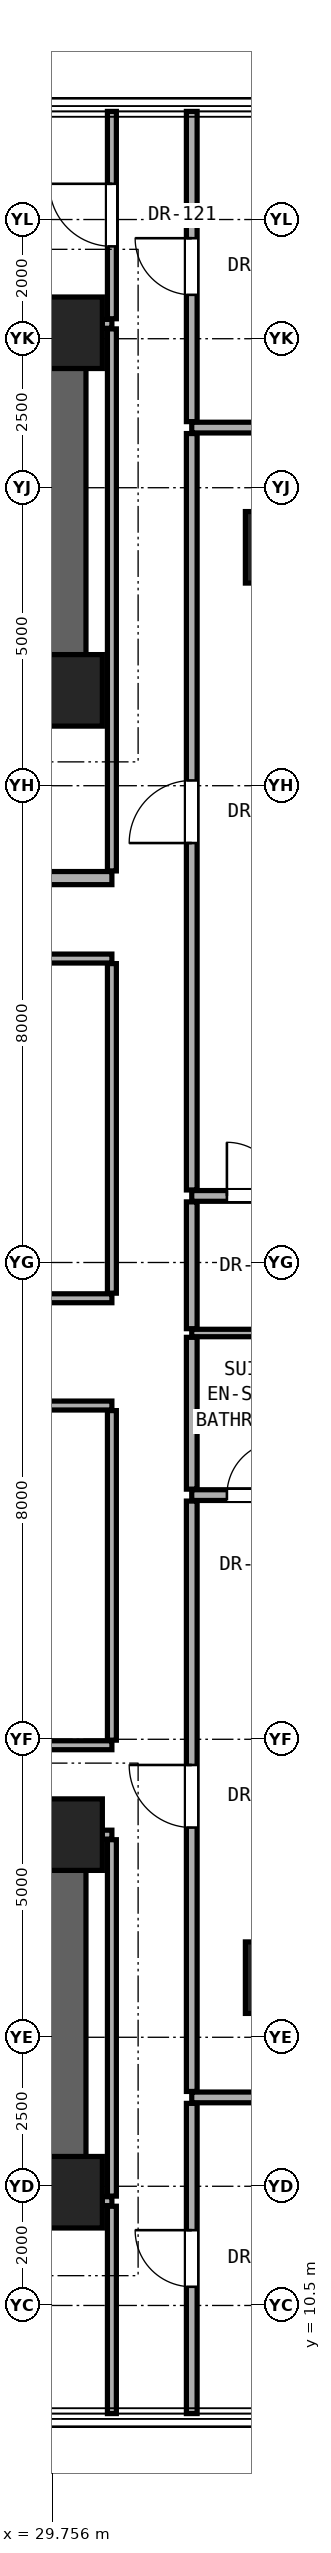
"""IFC4 building model, lengths in metres.
Left out: names, types, materials, properties, quantities, classifications, styles, units other than length and angle.
Written with IfcOpenShell. Run it as: python <this file> out.ifc"""

import sys

from ifc_helpers import new_model, si_unit, direction, frame, frame_2d, origin, origin_2d, place, context, subcontext, project, spatial, rectangle, extrude, element, fill, save


model = new_model("IFC4")
c1 = context("Model", 3, precision=1e-05, world=origin(), true_north=direction((0.0, 1.0)))
c2 = subcontext(c1, "Body", "Model", "MODEL_VIEW")
j1 = project(units=[si_unit("LENGTHUNIT", "METRE"), si_unit("PLANEANGLEUNIT", "RADIAN")], contexts=[c1])
p1 = place(None, origin())
s1 = spatial("IfcSite", under=j1, at=p1, CompositionType="ELEMENT")
p2 = place(p1, origin())
s2 = spatial("IfcBuilding", under=s1, at=p2, CompositionType="ELEMENT")
p3 = place(p2, frame((0.0, 0.0, 114.8)))
s3 = spatial("IfcBuildingStorey", under=s2, at=p3, CompositionType="ELEMENT", Elevation=114.8)
for number, where, z_axis, x_axis in (
    (1, (30.0, 12.4, 0.0), (0.0, 0.0, 1.0), (1.0, 0.0, 0.0)),
    (2, (30.0, 18.4, 0.0), (0.0, 0.0, 1.0), (1.0, 0.0, 0.0)),
    (3, (30.0, 37.6, 0.0), (0.0, 0.0, 1.0), (1.0, 0.0, 0.0)),
    (4, (30.0, 43.6, 0.0), (0.0, 0.0, 1.0), (1.0, 0.0, 0.0)),
):
    element("IfcColumn", number, at=place(p3, frame(where, z_axis=z_axis, x_axis=x_axis)), inside=s3, PredefinedType="COLUMN", context=c2, shape_type="SweptSolid", body=[
        extrude(rectangle(XDim=1.2, YDim=1.2, at=origin_2d()), origin(), (0.0, 0.0, 1.0), 3.3),
    ])
for number, where, z_axis, x_axis in (
    (5, (33.4, 16.0, 0.0), (0.0, 0.0, 1.0), (1.0, 0.0, 0.0)),
    (6, (33.4, 40.0, 0.0), (0.0, 0.0, 1.0), (1.0, 0.0, 0.0)),
):
    element("IfcColumn", number, at=place(p3, frame(where, z_axis=z_axis, x_axis=x_axis)), inside=s3, PredefinedType="PILASTER", context=c2, shape_type="SweptSolid", body=[
        extrude(rectangle(XDim=0.8, YDim=1.2, at=origin_2d()), origin(), (0.0, 0.0, 1.0), 3.3),
    ])
p4 = place(p3, frame((11.0, 43.6, 0.0), z_axis=(0.0, 0.0, 1.0), x_axis=(1.0, 0.0, 0.0)))
e7 = element("IfcWall", 7, at=p4, inside=s3, PredefinedType="SHEAR", context=c2, shape_type="SweptSolid", body=[
    extrude(rectangle(XDim=19.0, YDim=0.65, at=frame_2d((9.5, 0.0))), origin(), (0.0, 0.0, 1.0), 3.08),
])
p5 = place(p3, frame((30.0, 37.6, 0.0), z_axis=(0.0, 0.0, 1.0), x_axis=(0.0, 1.0, 0.0)))
e8 = element("IfcWall", 8, at=p5, inside=s3, PredefinedType="SHEAR", context=c2, shape_type="SweptSolid", body=[
    extrude(rectangle(XDim=6.0, YDim=0.65, at=frame_2d((3.0, 0.0))), origin(), (0.0, 0.0, 1.0), 3.08),
])
p6 = place(p3, frame((11.0, 37.6, 0.0), z_axis=(0.0, 0.0, 1.0), x_axis=(1.0, 0.0, 0.0)))
e9 = element("IfcWall", 9, at=p6, inside=s3, PredefinedType="SHEAR", context=c2, shape_type="SweptSolid", body=[
    extrude(rectangle(XDim=19.0, YDim=0.65, at=frame_2d((9.5, 0.0))), origin(), (0.0, 0.0, 1.0), 3.08),
])
p7 = place(p6, frame((1.06, 0.0, 0.0)))
e10 = element("IfcOpeningElement", 10, at=p7, cuts=e9, PredefinedType="OPENING", context=c2, shape_type="SweptSolid", body=[
    extrude(rectangle(XDim=1.15, YDim=2.2, at=frame_2d((0.575, 1.1))), frame((0.0, 0.335, 0.0), z_axis=(0.0, -1.0, 0.0), x_axis=(1.0, 0.0, 0.0)), (0.0, 0.0, 1.0), 0.67),
])
p8 = place(p6, frame((9.55, 0.0, 0.0)))
e11 = element("IfcOpeningElement", 11, at=p8, cuts=e9, PredefinedType="OPENING", context=c2, shape_type="SweptSolid", body=[
    extrude(rectangle(XDim=1.4, YDim=2.35, at=frame_2d((0.7, 1.175))), frame((0.0, 0.335, 0.0), z_axis=(0.0, -1.0, 0.0), x_axis=(1.0, 0.0, 0.0)), (0.0, 0.0, 1.0), 0.67),
])
p9 = place(p6, frame((11.95, 0.0, 0.0)))
e12 = element("IfcOpeningElement", 12, at=p9, cuts=e9, PredefinedType="OPENING", context=c2, shape_type="SweptSolid", body=[
    extrude(rectangle(XDim=1.4, YDim=2.35, at=frame_2d((0.7, 1.175))), frame((0.0, 0.335, 0.0), z_axis=(0.0, -1.0, 0.0), x_axis=(1.0, 0.0, 0.0)), (0.0, 0.0, 1.0), 0.67),
])
p10 = place(p3, frame((11.0, 12.4, 0.0), z_axis=(0.0, 0.0, 1.0), x_axis=(1.0, 0.0, 0.0)))
e13 = element("IfcWall", 13, at=p10, inside=s3, PredefinedType="SHEAR", context=c2, shape_type="SweptSolid", body=[
    extrude(rectangle(XDim=19.0, YDim=0.65, at=frame_2d((9.5, 0.0))), origin(), (0.0, 0.0, 1.0), 3.08),
])
p11 = place(p3, frame((30.0, 12.4, 0.0), z_axis=(0.0, 0.0, 1.0), x_axis=(0.0, 1.0, 0.0)))
e14 = element("IfcWall", 14, at=p11, inside=s3, PredefinedType="SHEAR", context=c2, shape_type="SweptSolid", body=[
    extrude(rectangle(XDim=6.0, YDim=0.65, at=frame_2d((3.0, 0.0))), origin(), (0.0, 0.0, 1.0), 3.08),
])
p12 = place(p3, frame((11.0, 18.4, 0.0), z_axis=(0.0, 0.0, 1.0), x_axis=(1.0, 0.0, 0.0)))
e15 = element("IfcWall", 15, at=p12, inside=s3, PredefinedType="SHEAR", context=c2, shape_type="SweptSolid", body=[
    extrude(rectangle(XDim=19.0, YDim=0.65, at=frame_2d((9.5, 0.0))), origin(), (0.0, 0.0, 1.0), 3.08),
])
p13 = place(p12, frame((4.175, 0.0, 0.0)))
e16 = element("IfcOpeningElement", 16, at=p13, cuts=e15, PredefinedType="OPENING", context=c2, shape_type="SweptSolid", body=[
    extrude(rectangle(XDim=1.2, YDim=2.25, at=frame_2d((0.6, 1.125))), frame((0.0, 0.335, 0.0), z_axis=(0.0, -1.0, 0.0), x_axis=(1.0, 0.0, 0.0)), (0.0, 0.0, 1.0), 0.67),
])
p14 = place(p12, frame((9.6, 0.0, 0.0)))
e17 = element("IfcOpeningElement", 17, at=p14, cuts=e15, PredefinedType="OPENING", context=c2, shape_type="SweptSolid", body=[
    extrude(rectangle(XDim=1.3, YDim=2.3, at=frame_2d((0.65, 1.15))), frame((0.0, 0.335, 0.0), z_axis=(0.0, -1.0, 0.0), x_axis=(1.0, 0.0, 0.0)), (0.0, 0.0, 1.0), 0.67),
])
p15 = place(p12, frame((11.9, 0.0, 0.0)))
e18 = element("IfcOpeningElement", 18, at=p15, cuts=e15, PredefinedType="OPENING", context=c2, shape_type="SweptSolid", body=[
    extrude(rectangle(XDim=1.3, YDim=2.3, at=frame_2d((0.65, 1.15))), frame((0.0, 0.335, 0.0), z_axis=(0.0, -1.0, 0.0), x_axis=(1.0, 0.0, 0.0)), (0.0, 0.0, 1.0), 0.67),
])
p16 = place(p12, frame((14.3, 0.0, 0.0)))
e19 = element("IfcOpeningElement", 19, at=p16, cuts=e15, PredefinedType="OPENING", context=c2, shape_type="SweptSolid", body=[
    extrude(rectangle(XDim=1.3, YDim=2.3, at=frame_2d((0.65, 1.15))), frame((0.0, 0.335, 0.0), z_axis=(0.0, -1.0, 0.0), x_axis=(1.0, 0.0, 0.0)), (0.0, 0.0, 1.0), 0.67),
])
p17 = place(p12, frame((16.6, 0.0, 0.0)))
e20 = element("IfcOpeningElement", 20, at=p17, cuts=e15, PredefinedType="OPENING", context=c2, shape_type="SweptSolid", body=[
    extrude(rectangle(XDim=1.3, YDim=2.3, at=frame_2d((0.65, 1.15))), frame((0.0, 0.335, 0.0), z_axis=(0.0, -1.0, 0.0), x_axis=(1.0, 0.0, 0.0)), (0.0, 0.0, 1.0), 0.67),
])
p18 = place(p3, frame((30.32, 12.25, 0.0), z_axis=(0.0, 0.0, 1.0), x_axis=(1.0, 0.0, 0.0)))
e21 = element("IfcWall", 21, at=p18, inside=s3, PredefinedType="PARTITIONING", context=c2, shape_type="SweptSolid", body=[
    extrude(rectangle(XDim=0.44, YDim=0.15, at=frame_2d((0.22, 0.0))), origin(), (0.0, 0.0, 1.0), 3.08),
])
p19 = place(p3, frame((32.1, 13.991, 0.0), z_axis=(0.0, 0.0, 1.0), x_axis=(1.0, 0.0, 0.0)))
e22 = element("IfcWall", 22, at=p19, inside=s3, PredefinedType="PARTITIONING", context=c2, shape_type="SweptSolid", body=[
    extrude(rectangle(XDim=5.545, YDim=0.18, at=frame_2d((2.772, 0.0))), origin(), (0.0, 0.0, 1.0), 3.08),
])
p20 = place(p3, frame((30.32, 18.4, 0.0), z_axis=(0.0, 0.0, 1.0), x_axis=(1.0, 0.0, 0.0)))
e23 = element("IfcWall", 23, at=p20, inside=s3, PredefinedType="PARTITIONING", context=c2, shape_type="SweptSolid", body=[
    extrude(rectangle(XDim=0.44, YDim=0.15, at=frame_2d((0.22, 0.0))), origin(), (0.0, 0.0, 1.0), 2.456),
])
p21 = place(p3, frame((21.44, 19.9, 0.0), z_axis=(0.0, 0.0, 1.0), x_axis=(1.0, 0.0, 0.0)))
e24 = element("IfcWall", 24, at=p21, inside=s3, PredefinedType="PARTITIONING", context=c2, shape_type="SweptSolid", body=[
    extrude(rectangle(XDim=9.32, YDim=0.15, at=frame_2d((4.66, 0.0))), origin(), (0.0, 0.0, 1.0), 2.124),
])
p22 = place(p21, frame((4.235, 0.0, 0.0)))
e25 = element("IfcOpeningElement", 25, at=p22, cuts=e24, PredefinedType="OPENING", context=c2, shape_type="SweptSolid", body=[
    extrude(rectangle(XDim=0.85, YDim=2.01, at=frame_2d((0.425, 1.005))), frame((0.0, 0.085, 0.0), z_axis=(0.0, -1.0, 0.0), x_axis=(1.0, 0.0, 0.0)), (0.0, 0.0, 1.0), 0.17),
])
p23 = place(p3, frame((32.1, 24.097, 0.0), z_axis=(0.0, 0.0, 1.0), x_axis=(1.0, 0.0, 0.0)))
e26 = element("IfcWall", 26, at=p23, inside=s3, PredefinedType="PARTITIONING", context=c2, shape_type="SweptSolid", body=[
    extrude(rectangle(XDim=10.87, YDim=0.18, at=frame_2d((5.435, 0.0))), origin(), (0.0, 0.0, 1.0), 2.145),
])
p24 = place(p23, frame((5.06, 0.0, 0.0)))
e27 = element("IfcOpeningElement", 27, at=p24, cuts=e26, PredefinedType="OPENING", context=c2, shape_type="SweptSolid", body=[
    extrude(rectangle(XDim=0.85, YDim=2.01, at=frame_2d((0.425, 1.005))), frame((0.0, 0.1, 0.0), z_axis=(0.0, -1.0, 0.0), x_axis=(1.0, 0.0, 0.0)), (0.0, 0.0, 1.0), 0.2),
])
p25 = place(p23, frame((0.59, 0.0, 0.0)))
e28 = element("IfcOpeningElement", 28, at=p25, cuts=e26, PredefinedType="OPENING", context=c2, shape_type="SweptSolid", body=[
    extrude(rectangle(XDim=0.9, YDim=2.1, at=frame_2d((0.45, 1.05))), frame((0.0, 0.1, 0.0), z_axis=(0.0, -1.0, 0.0), x_axis=(1.0, 0.0, 0.0)), (0.0, 0.0, 1.0), 0.2),
])
p26 = place(p3, frame((21.4, 25.6, 0.0), z_axis=(0.0, 0.0, 1.0), x_axis=(1.0, 0.0, 0.0)))
e29 = element("IfcWall", 29, at=p26, inside=s3, PredefinedType="PARTITIONING", context=c2, shape_type="SweptSolid", body=[
    extrude(rectangle(XDim=9.36, YDim=0.15, at=frame_2d((4.68, 0.0))), origin(), (0.0, 0.0, 1.0), 2.124),
])
p27 = place(p3, frame((32.1, 26.817, 0.0), z_axis=(0.0, 0.0, 1.0), x_axis=(1.0, 0.0, 0.0)))
e30 = element("IfcWall", 30, at=p27, inside=s3, PredefinedType="PARTITIONING", context=c2, shape_type="SweptSolid", body=[
    extrude(rectangle(XDim=10.87, YDim=0.125, at=frame_2d((5.435, 0.0))), origin(), (0.0, 0.0, 1.0), 2.145),
])
p28 = place(p3, frame((21.4, 27.4, 0.0), z_axis=(0.0, 0.0, 1.0), x_axis=(1.0, 0.0, 0.0)))
e31 = element("IfcWall", 31, at=p28, inside=s3, PredefinedType="PARTITIONING", context=c2, shape_type="SweptSolid", body=[
    extrude(rectangle(XDim=9.36, YDim=0.15, at=frame_2d((4.68, 0.0))), origin(), (0.0, 0.0, 1.0), 2.124),
])
p29 = place(p3, frame((32.1, 29.117, 0.0), z_axis=(0.0, 0.0, 1.0), x_axis=(1.0, 0.0, 0.0)))
e32 = element("IfcWall", 32, at=p29, inside=s3, PredefinedType="PARTITIONING", context=c2, shape_type="SweptSolid", body=[
    extrude(rectangle(XDim=10.87, YDim=0.18, at=frame_2d((5.435, 0.0))), origin(), (0.0, 0.0, 1.0), 2.145),
])
p30 = place(p29, frame((6.01, 0.0, 0.0)))
e33 = element("IfcOpeningElement", 33, at=p30, cuts=e32, PredefinedType="OPENING", context=c2, shape_type="SweptSolid", body=[
    extrude(rectangle(XDim=0.85, YDim=2.01, at=frame_2d((0.425, 1.005))), frame((0.0, 0.1, 0.0), z_axis=(0.0, -1.0, 0.0), x_axis=(1.0, 0.0, 0.0)), (0.0, 0.0, 1.0), 0.2),
])
p31 = place(p29, frame((0.59, 0.0, 0.0)))
e34 = element("IfcOpeningElement", 34, at=p31, cuts=e32, PredefinedType="OPENING", context=c2, shape_type="SweptSolid", body=[
    extrude(rectangle(XDim=0.9, YDim=2.1, at=frame_2d((0.45, 1.05))), frame((0.0, 0.1, 0.0), z_axis=(0.0, -1.0, 0.0), x_axis=(1.0, 0.0, 0.0)), (0.0, 0.0, 1.0), 0.2),
])
p32 = place(p3, frame((21.44, 33.1, 0.0), z_axis=(0.0, 0.0, 1.0), x_axis=(1.0, 0.0, 0.0)))
e35 = element("IfcWall", 35, at=p32, inside=s3, PredefinedType="PARTITIONING", context=c2, shape_type="SweptSolid", body=[
    extrude(rectangle(XDim=9.32, YDim=0.15, at=frame_2d((4.66, 0.0))), origin(), (0.0, 0.0, 1.0), 2.124),
])
p33 = place(p32, frame((4.235, 0.0, 0.0)))
e36 = element("IfcOpeningElement", 36, at=p33, cuts=e35, PredefinedType="OPENING", context=c2, shape_type="SweptSolid", body=[
    extrude(rectangle(XDim=0.85, YDim=2.01, at=frame_2d((0.425, 1.005))), frame((0.0, 0.085, 0.0), z_axis=(0.0, -1.0, 0.0), x_axis=(1.0, 0.0, 0.0)), (0.0, 0.0, 1.0), 0.17),
])
p34 = place(p3, frame((15.59, 34.45, 0.0), z_axis=(0.0, 0.0, 1.0), x_axis=(1.0, 0.0, 0.0)))
e37 = element("IfcWall", 37, at=p34, inside=s3, PredefinedType="SOLIDWALL", context=c2, shape_type="SweptSolid", body=[
    extrude(rectangle(XDim=15.17, YDim=0.22, at=frame_2d((7.585, 0.0))), origin(), (0.0, 0.0, 1.0), 2.124),
])
p35 = place(p34, frame((6.435, 0.0, 0.0)))
e38 = element("IfcOpeningElement", 38, at=p35, cuts=e37, PredefinedType="OPENING", context=c2, shape_type="SweptSolid", body=[
    extrude(rectangle(XDim=0.85, YDim=2.01, at=frame_2d((0.425, 1.005))), frame((0.0, 0.12, 0.0), z_axis=(0.0, -1.0, 0.0), x_axis=(1.0, 0.0, 0.0)), (0.0, 0.0, 1.0), 0.24),
])
p36 = place(p34, frame((11.135, 0.0, 0.0)))
e39 = element("IfcOpeningElement", 39, at=p36, cuts=e37, PredefinedType="OPENING", context=c2, shape_type="SweptSolid", body=[
    extrude(rectangle(XDim=0.85, YDim=2.01, at=frame_2d((0.425, 1.005))), frame((0.0, 0.12, 0.0), z_axis=(0.0, -1.0, 0.0), x_axis=(1.0, 0.0, 0.0)), (0.0, 0.0, 1.0), 0.24),
])
p37 = place(p34, frame((1.775, 0.0, 0.0)))
e40 = element("IfcOpeningElement", 40, at=p37, cuts=e37, PredefinedType="OPENING", context=c2, shape_type="SweptSolid", body=[
    extrude(rectangle(XDim=0.85, YDim=2.01, at=frame_2d((0.425, 1.005))), frame((0.0, 0.12, 0.0), z_axis=(0.0, -1.0, 0.0), x_axis=(1.0, 0.0, 0.0)), (0.0, 0.0, 1.0), 0.24),
])
p38 = place(p3, frame((32.1, 42.009, 0.0), z_axis=(0.0, 0.0, 1.0), x_axis=(1.0, 0.0, 0.0)))
e41 = element("IfcWall", 41, at=p38, inside=s3, PredefinedType="PARTITIONING", context=c2, shape_type="SweptSolid", body=[
    extrude(rectangle(XDim=5.545, YDim=0.18, at=frame_2d((2.772, 0.0))), origin(), (0.0, 0.0, 1.0), 3.08),
])
p39 = place(p3, frame((30.32, 43.75, 0.0), z_axis=(0.0, 0.0, 1.0), x_axis=(1.0, 0.0, 0.0)))
e42 = element("IfcWall", 42, at=p39, inside=s3, PredefinedType="PARTITIONING", context=c2, shape_type="SweptSolid", body=[
    extrude(rectangle(XDim=0.44, YDim=0.15, at=frame_2d((0.22, 0.0))), origin(), (0.0, 0.0, 1.0), 3.08),
])
p40 = place(p3, frame((30.76, 8.686, 0.0), z_axis=(0.0, 0.0, 1.0), x_axis=(0.0, 1.0, 0.0)))
e43 = element("IfcWall", 43, at=p40, inside=s3, PredefinedType="PARTITIONING", context=c2, shape_type="SweptSolid", body=[
    extrude(rectangle(XDim=3.479, YDim=0.15, at=frame_2d((1.74, 0.0))), origin(), (0.0, 0.0, 1.0), 3.08),
])
p41 = place(p3, frame((30.76, 12.335, 0.0), z_axis=(0.0, 0.0, 1.0), x_axis=(0.0, 1.0, 0.0)))
e44 = element("IfcWall", 44, at=p41, inside=s3, PredefinedType="PARTITIONING", context=c2, shape_type="SweptSolid", body=[
    extrude(rectangle(XDim=5.98, YDim=0.15, at=frame_2d((2.99, 0.0))), origin(), (0.0, 0.0, 1.0), 2.456),
])
for number, where, z_axis, x_axis in (
    (45, (30.76, 19.985, 0.0), (0.0, 0.0, 1.0), (0.0, 1.0, 0.0)),
    (46, (30.76, 27.485, 0.0), (0.0, 0.0, 1.0), (0.0, 1.0, 0.0)),
):
    element("IfcWall", number, at=place(p3, frame(where, z_axis=z_axis, x_axis=x_axis)), inside=s3, PredefinedType="PARTITIONING", context=c2, shape_type="SweptSolid", body=[
        extrude(rectangle(XDim=5.53, YDim=0.15, at=frame_2d((2.765, 0.0))), origin(), (0.0, 0.0, 1.0), 2.299),
    ])
p42 = place(p3, frame((30.76, 34.57, 0.0), z_axis=(0.0, 0.0, 1.0), x_axis=(0.0, 1.0, 0.0)))
e47 = element("IfcWall", 47, at=p42, inside=s3, PredefinedType="PARTITIONING", context=c2, shape_type="SweptSolid", body=[
    extrude(rectangle(XDim=9.095, YDim=0.15, at=frame_2d((4.547, 0.0))), origin(), (0.0, 0.0, 1.0), 2.456),
])
p43 = place(p3, frame((30.76, 43.835, 0.0), z_axis=(0.0, 0.0, 1.0), x_axis=(0.0, 1.0, 0.0)))
e48 = element("IfcWall", 48, at=p43, inside=s3, PredefinedType="PARTITIONING", context=c2, shape_type="SweptSolid", body=[
    extrude(rectangle(XDim=3.479, YDim=0.15, at=frame_2d((1.74, 0.0))), origin(), (0.0, 0.0, 1.0), 3.08),
])
p44 = place(p43, frame((1.215, 0.0, 0.0)))
e49 = element("IfcOpeningElement", 49, at=p44, cuts=e48, PredefinedType="OPENING", context=c2, shape_type="SweptSolid", body=[
    extrude(rectangle(XDim=1.05, YDim=2.2, at=frame_2d((0.525, 1.1))), frame((0.0, 0.085, 0.0), z_axis=(0.0, -1.0, 0.0), x_axis=(1.0, 0.0, 0.0)), (0.0, 0.0, 1.0), 0.17),
])
p45 = place(p3, frame((32.1, 8.686, 0.0), z_axis=(0.0, 0.0, 1.0), x_axis=(0.0, 1.0, 0.0)))
e50 = element("IfcWall", 50, at=p45, inside=s3, PredefinedType="PARTITIONING", context=c2, shape_type="SweptSolid", body=[
    extrude(rectangle(XDim=5.205, YDim=0.18, at=frame_2d((2.603, 0.0))), origin(), (0.0, 0.0, 1.0), 3.08),
])
p46 = place(p45, frame((2.127, 0.0, 0.0)))
e51 = element("IfcOpeningElement", 51, at=p46, cuts=e50, PredefinedType="OPENING", context=c2, shape_type="SweptSolid", body=[
    extrude(rectangle(XDim=0.95, YDim=2.15, at=frame_2d((0.475, 1.075))), frame((0.0, 0.1, 0.0), z_axis=(0.0, -1.0, 0.0), x_axis=(1.0, 0.0, 0.0)), (0.0, 0.0, 1.0), 0.2),
])
p47 = place(p3, frame((32.1, 14.091, 0.0), z_axis=(0.0, 0.0, 1.0), x_axis=(0.0, 1.0, 0.0)))
e52 = element("IfcWall", 52, at=p47, inside=s3, PredefinedType="PARTITIONING", context=c2, shape_type="SweptSolid", body=[
    extrude(rectangle(XDim=9.906, YDim=0.18, at=frame_2d((4.953, 0.0))), origin(), (0.0, 0.0, 1.0), 2.456),
])
p48 = place(p47, frame((4.428, 0.0, 0.0)))
e53 = element("IfcOpeningElement", 53, at=p48, cuts=e52, PredefinedType="OPENING", context=c2, shape_type="SweptSolid", body=[
    extrude(rectangle(XDim=1.05, YDim=2.2, at=frame_2d((0.525, 1.1))), frame((0.0, 0.1, 0.0), z_axis=(0.0, -1.0, 0.0), x_axis=(1.0, 0.0, 0.0)), (0.0, 0.0, 1.0), 0.2),
])
p49 = place(p3, frame((32.1, 24.197, 0.0), z_axis=(0.0, 0.0, 1.0), x_axis=(0.0, 1.0, 0.0)))
e54 = element("IfcWall", 54, at=p49, inside=s3, PredefinedType="PARTITIONING", context=c2, shape_type="SweptSolid", body=[
    extrude(rectangle(XDim=2.547, YDim=0.18, at=frame_2d((1.274, 0.0))), origin(), (0.0, 0.0, 1.0), 2.299),
])
p50 = place(p3, frame((32.1, 26.889, 0.0), z_axis=(0.0, 0.0, 1.0), x_axis=(0.0, 1.0, 0.0)))
e55 = element("IfcWall", 55, at=p50, inside=s3, PredefinedType="PARTITIONING", context=c2, shape_type="SweptSolid", body=[
    extrude(rectangle(XDim=2.128, YDim=0.18, at=frame_2d((1.064, 0.0))), origin(), (0.0, 0.0, 1.0), 3.08),
])
p51 = place(p3, frame((32.1, 29.217, 0.0), z_axis=(0.0, 0.0, 1.0), x_axis=(0.0, 1.0, 0.0)))
e56 = element("IfcWall", 56, at=p51, inside=s3, PredefinedType="PARTITIONING", context=c2, shape_type="SweptSolid", body=[
    extrude(rectangle(XDim=12.692, YDim=0.18, at=frame_2d((6.346, 0.0))), origin(), (0.0, 0.0, 1.0), 2.299),
])
p52 = place(p51, frame((5.821, 0.0, 0.0)))
e57 = element("IfcOpeningElement", 57, at=p52, cuts=e56, PredefinedType="OPENING", context=c2, shape_type="SweptSolid", body=[
    extrude(rectangle(XDim=1.05, YDim=2.2, at=frame_2d((0.525, 1.1))), frame((0.0, 0.1, 0.0), z_axis=(0.0, -1.0, 0.0), x_axis=(1.0, 0.0, 0.0)), (0.0, 0.0, 1.0), 0.2),
])
p53 = place(p3, frame((32.1, 42.109, 0.0), z_axis=(0.0, 0.0, 1.0), x_axis=(0.0, 1.0, 0.0)))
e58 = element("IfcWall", 58, at=p53, inside=s3, PredefinedType="PARTITIONING", context=c2, shape_type="SweptSolid", body=[
    extrude(rectangle(XDim=5.205, YDim=0.18, at=frame_2d((2.603, 0.0))), origin(), (0.0, 0.0, 1.0), 3.08),
])
p54 = place(p53, frame((2.127, 0.0, 0.0)))
e59 = element("IfcOpeningElement", 59, at=p54, cuts=e58, PredefinedType="OPENING", context=c2, shape_type="SweptSolid", body=[
    extrude(rectangle(XDim=0.95, YDim=2.15, at=frame_2d((0.475, 1.075))), frame((0.0, 0.1, 0.0), z_axis=(0.0, -1.0, 0.0), x_axis=(1.0, 0.0, 0.0)), (0.0, 0.0, 1.0), 0.2),
])
p55 = place(p48, origin())
e60 = element("IfcDoor", 60, at=p55, inside=s3, OperationType="SINGLE_SWING_RIGHT", PredefinedType="DOOR", context=c2, shape_type="SweptSolid", body=[
    extrude(rectangle(XDim=1.05, YDim=2.2, at=frame_2d((0.525, 1.1))), frame((0.0, 0.025, 0.0), z_axis=(0.0, -1.0, 0.0), x_axis=(1.0, 0.0, 0.0)), (0.0, 0.0, 1.0), 0.05),
])
fill(e53, e60)
p56 = place(p25, origin())
e61 = element("IfcDoor", 61, at=p56, inside=s3, OperationType="SINGLE_SWING_RIGHT", PredefinedType="DOOR", context=c2, shape_type="SweptSolid", body=[
    extrude(rectangle(XDim=0.9, YDim=2.1, at=frame_2d((0.45, 1.05))), frame((0.0, 0.025, 0.0), z_axis=(0.0, -1.0, 0.0), x_axis=(1.0, 0.0, 0.0)), (0.0, 0.0, 1.0), 0.05),
])
fill(e28, e61)
p57 = place(p52, origin())
e62 = element("IfcDoor", 62, at=p57, inside=s3, OperationType="SINGLE_SWING_LEFT", PredefinedType="DOOR", context=c2, shape_type="SweptSolid", body=[
    extrude(rectangle(XDim=1.05, YDim=2.2, at=frame_2d((0.525, 1.1))), frame((0.0, 0.025, 0.0), z_axis=(0.0, -1.0, 0.0), x_axis=(1.0, 0.0, 0.0)), (0.0, 0.0, 1.0), 0.05),
])
fill(e57, e62)
p58 = place(p31, origin())
e63 = element("IfcDoor", 63, at=p58, inside=s3, OperationType="SINGLE_SWING_LEFT", PredefinedType="DOOR", context=c2, shape_type="SweptSolid", body=[
    extrude(rectangle(XDim=0.9, YDim=2.1, at=frame_2d((0.45, 1.05))), frame((0.0, 0.025, 0.0), z_axis=(0.0, -1.0, 0.0), x_axis=(1.0, 0.0, 0.0)), (0.0, 0.0, 1.0), 0.05),
])
fill(e34, e63)
p59 = place(p46, origin())
e64 = element("IfcDoor", 64, at=p59, inside=s3, OperationType="SINGLE_SWING_RIGHT", PredefinedType="DOOR", context=c2, shape_type="SweptSolid", body=[
    extrude(rectangle(XDim=0.95, YDim=2.15, at=frame_2d((0.475, 1.075))), frame((0.0, 0.025, 0.0), z_axis=(0.0, -1.0, 0.0), x_axis=(1.0, 0.0, 0.0)), (0.0, 0.0, 1.0), 0.05),
])
fill(e51, e64)
p60 = place(p44, origin())
e65 = element("IfcDoor", 65, at=p60, inside=s3, OperationType="SINGLE_SWING_RIGHT", PredefinedType="DOOR", context=c2, shape_type="SweptSolid", body=[
    extrude(rectangle(XDim=1.05, YDim=2.2, at=frame_2d((0.525, 1.1))), frame((0.0, 0.025, 0.0), z_axis=(0.0, -1.0, 0.0), x_axis=(1.0, 0.0, 0.0)), (0.0, 0.0, 1.0), 0.05),
])
fill(e49, e65)
p61 = place(p54, origin())
e66 = element("IfcDoor", 66, at=p61, inside=s3, OperationType="SINGLE_SWING_RIGHT", PredefinedType="DOOR", context=c2, shape_type="SweptSolid", body=[
    extrude(rectangle(XDim=0.95, YDim=2.15, at=frame_2d((0.475, 1.075))), frame((0.0, 0.025, 0.0), z_axis=(0.0, -1.0, 0.0), x_axis=(1.0, 0.0, 0.0)), (0.0, 0.0, 1.0), 0.05),
])
fill(e59, e66)
save(model, sys.argv[1])
